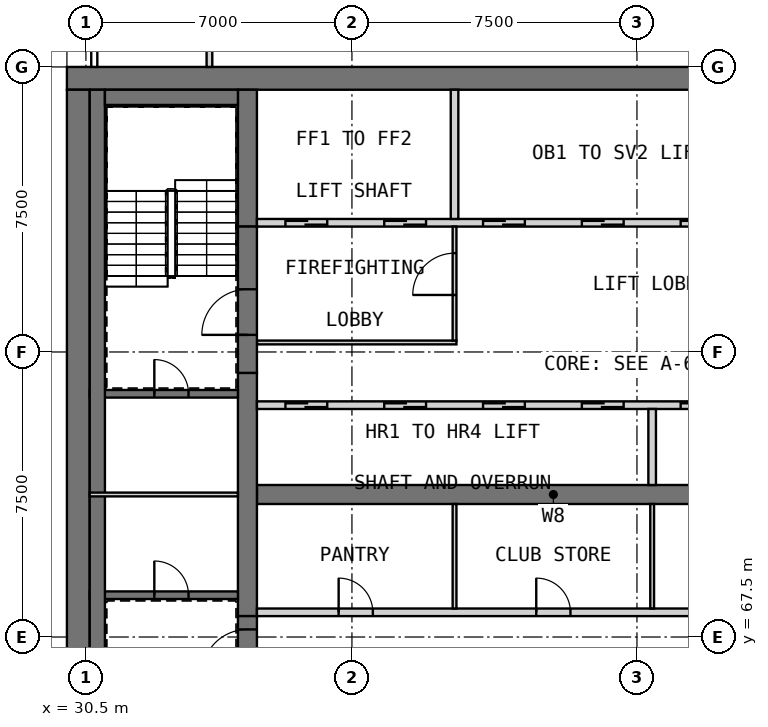
"""IFC4 building model, lengths in metres.
Left out: names, types, materials, properties, quantities, classifications, styles, units other than length and angle.
Written with IfcOpenShell. Run it as: python <this file> out.ifc"""

import sys

from ifc_helpers import new_model, si_unit, direction, frame, frame_2d, origin, place, context, subcontext, project, spatial, rectangle, extrude, element, fill, save


model = new_model("IFC4")
c1 = context("Model", 3, precision=1e-05, world=origin(), true_north=direction((0.0, 1.0)))
c2 = subcontext(c1, "Body", "Model", "MODEL_VIEW")
j1 = project(units=[si_unit("LENGTHUNIT", "METRE"), si_unit("PLANEANGLEUNIT", "RADIAN")], contexts=[c1])
p1 = place(None, origin())
s1 = spatial("IfcSite", under=j1, at=p1, CompositionType="ELEMENT")
p2 = place(p1, origin())
s2 = spatial("IfcBuilding", under=s1, at=p2, CompositionType="ELEMENT")
p3 = place(p2, frame((0.0, 0.0, 308.7)))
s3 = spatial("IfcBuildingStorey", under=s2, at=p3, CompositionType="ELEMENT", Elevation=308.7)
p4 = place(p3, frame((30.0, 82.2, 0.0), z_axis=(0.0, 0.0, 1.0), x_axis=(1.0, 0.0, 0.0)))
e1 = element("IfcWall", 1, at=p4, inside=s3, PredefinedType="SHEAR", context=c2, shape_type="SweptSolid", body=[
    extrude(rectangle(XDim=30.0, YDim=0.6, at=frame_2d((15.0, 0.0))), origin(), (0.0, 0.0, 1.0), 6.0),
])
p5 = place(p3, frame((30.3, 60.6, 0.0), z_axis=(0.0, 0.0, 1.0), x_axis=(0.0, 1.0, 0.0)))
e2 = element("IfcWall", 2, at=p5, inside=s3, PredefinedType="SHEAR", context=c2, shape_type="SweptSolid", body=[
    extrude(rectangle(XDim=21.3, YDim=0.6, at=frame_2d((10.65, 0.0))), origin(), (0.0, 0.0, 1.0), 6.0),
])
p6 = place(p3, frame((35.0, 71.25, 0.0), z_axis=(0.0, 0.0, 1.0), x_axis=(1.0, 0.0, 0.0)))
e3 = element("IfcWall", 3, at=p6, inside=s3, PredefinedType="SHEAR", context=c2, shape_type="SweptSolid", body=[
    extrude(rectangle(XDim=15.6, YDim=0.5, at=frame_2d((7.8, 0.0))), origin(), (0.0, 0.0, 1.0), 6.0),
])
p7 = place(p3, frame((34.75, 68.05, 0.0), z_axis=(0.0, 0.0, 1.0), x_axis=(0.0, 1.0, 0.0)))
e4 = element("IfcWall", 4, at=p7, inside=s3, PredefinedType="SHEAR", context=c2, shape_type="SweptSolid", body=[
    extrude(rectangle(XDim=6.4, YDim=0.5, at=frame_2d((3.2, 0.0))), origin(), (0.0, 0.0, 1.0), 6.0),
])
p8 = place(p3, frame((34.75, 78.3, 0.0), z_axis=(0.0, 0.0, 1.0), x_axis=(0.0, 1.0, 0.0)))
e5 = element("IfcWall", 5, at=p8, inside=s3, PredefinedType="SHEAR", context=c2, shape_type="SweptSolid", body=[
    extrude(rectangle(XDim=3.6, YDim=0.5, at=frame_2d((1.8, 0.0))), origin(), (0.0, 0.0, 1.0), 6.0),
])
p9 = place(p2, frame((0.0, 0.0, 34.0)))
s4 = spatial("IfcBuildingStorey", under=s2, at=p9, CompositionType="ELEMENT", Elevation=34.0)
for number, where, z_axis, x_axis in (
    (6, (29.7, 70.8, 0.0), (0.0, 0.0, 1.0), (0.0, 1.0, 0.0)),
    (7, (29.7, 75.675, 0.0), (0.0, 0.0, 1.0), (0.0, 1.0, 0.0)),
    (8, (29.7, 80.55, 0.0), (0.0, 0.0, 1.0), (0.0, 1.0, 0.0)),
):
    element("IfcWall", number, at=place(p9, frame(where, z_axis=z_axis, x_axis=x_axis)), inside=s4, PredefinedType="SOLIDWALL", context=c2, shape_type="SweptSolid", body=[
        extrude(rectangle(XDim=0.9, YDim=0.6, at=frame_2d((0.45, 0.0))), origin(), (0.0, 0.0, 1.0), 286.2),
    ])
p10 = place(p3, frame((35.0, 68.15, 0.0), z_axis=(0.0, 0.0, 1.0), x_axis=(1.0, 0.0, 0.0)))
e9 = element("IfcWall", 9, at=p10, inside=s3, PredefinedType="PARTITIONING", context=c2, shape_type="SweptSolid", body=[
    extrude(rectangle(XDim=15.6, YDim=0.2, at=frame_2d((7.8, 0.0))), origin(), (0.0, 0.0, 1.0), 5.59),
])
p11 = place(p10, frame((2.15, 0.0, 0.0)))
e10 = element("IfcOpeningElement", 10, at=p11, cuts=e9, PredefinedType="OPENING", context=c2, shape_type="SweptSolid", body=[
    extrude(rectangle(XDim=0.9, YDim=2.1, at=frame_2d((0.45, 1.05))), frame((0.0, 0.11, 0.0), z_axis=(0.0, -1.0, 0.0), x_axis=(1.0, 0.0, 0.0)), (0.0, 0.0, 1.0), 0.22),
])
p12 = place(p10, frame((7.35, 0.0, 0.0)))
e11 = element("IfcOpeningElement", 11, at=p12, cuts=e9, PredefinedType="OPENING", context=c2, shape_type="SweptSolid", body=[
    extrude(rectangle(XDim=0.9, YDim=2.1, at=frame_2d((0.45, 1.05))), frame((0.0, 0.11, 0.0), z_axis=(0.0, -1.0, 0.0), x_axis=(1.0, 0.0, 0.0)), (0.0, 0.0, 1.0), 0.22),
])
p13 = place(p10, frame((12.55, 0.0, 0.0)))
e12 = element("IfcOpeningElement", 12, at=p13, cuts=e9, PredefinedType="OPENING", context=c2, shape_type="SweptSolid", body=[
    extrude(rectangle(XDim=0.9, YDim=2.1, at=frame_2d((0.45, 1.05))), frame((0.0, 0.11, 0.0), z_axis=(0.0, -1.0, 0.0), x_axis=(1.0, 0.0, 0.0)), (0.0, 0.0, 1.0), 0.22),
])
for number, where, z_axis, x_axis in (
    (13, (40.2, 68.25, 0.0), (0.0, 0.0, 1.0), (0.0, 1.0, 0.0)),
    (14, (45.4, 68.25, 0.0), (0.0, 0.0, 1.0), (0.0, 1.0, 0.0)),
):
    element("IfcWall", number, at=place(p3, frame(where, z_axis=z_axis, x_axis=x_axis)), inside=s3, PredefinedType="PARTITIONING", context=c2, shape_type="SweptSolid", body=[
        extrude(rectangle(XDim=2.75, YDim=0.1, at=frame_2d((1.375, 0.0))), origin(), (0.0, 0.0, 1.0), 5.59),
    ])
p14 = place(p3, frame((35.0, 73.6, 0.0), z_axis=(0.0, 0.0, 1.0), x_axis=(1.0, 0.0, 0.0)))
e15 = element("IfcWall", 15, at=p14, inside=s3, PredefinedType="SOLIDWALL", context=c2, shape_type="SweptSolid", body=[
    extrude(rectangle(XDim=15.6, YDim=0.2, at=frame_2d((7.8, 0.0))), origin(), (0.0, 0.0, 1.0), 6.0),
])
p15 = place(p14, frame((0.75, 0.0, 0.0)))
e16 = element("IfcOpeningElement", 16, at=p15, cuts=e15, PredefinedType="OPENING", context=c2, shape_type="SweptSolid", body=[
    extrude(rectangle(XDim=1.1, YDim=2.1, at=frame_2d((0.55, 1.05))), frame((0.0, 0.11, 0.0), z_axis=(0.0, -1.0, 0.0), x_axis=(1.0, 0.0, 0.0)), (0.0, 0.0, 1.0), 0.22),
])
p16 = place(p14, frame((3.35, 0.0, 0.0)))
e17 = element("IfcOpeningElement", 17, at=p16, cuts=e15, PredefinedType="OPENING", context=c2, shape_type="SweptSolid", body=[
    extrude(rectangle(XDim=1.1, YDim=2.1, at=frame_2d((0.55, 1.05))), frame((0.0, 0.11, 0.0), z_axis=(0.0, -1.0, 0.0), x_axis=(1.0, 0.0, 0.0)), (0.0, 0.0, 1.0), 0.22),
])
p17 = place(p14, frame((5.95, 0.0, 0.0)))
e18 = element("IfcOpeningElement", 18, at=p17, cuts=e15, PredefinedType="OPENING", context=c2, shape_type="SweptSolid", body=[
    extrude(rectangle(XDim=1.1, YDim=2.1, at=frame_2d((0.55, 1.05))), frame((0.0, 0.11, 0.0), z_axis=(0.0, -1.0, 0.0), x_axis=(1.0, 0.0, 0.0)), (0.0, 0.0, 1.0), 0.22),
])
p18 = place(p14, frame((8.55, 0.0, 0.0)))
e19 = element("IfcOpeningElement", 19, at=p18, cuts=e15, PredefinedType="OPENING", context=c2, shape_type="SweptSolid", body=[
    extrude(rectangle(XDim=1.1, YDim=2.1, at=frame_2d((0.55, 1.05))), frame((0.0, 0.11, 0.0), z_axis=(0.0, -1.0, 0.0), x_axis=(1.0, 0.0, 0.0)), (0.0, 0.0, 1.0), 0.22),
])
p19 = place(p14, frame((11.15, 0.0, 0.0)))
e20 = element("IfcOpeningElement", 20, at=p19, cuts=e15, PredefinedType="OPENING", context=c2, shape_type="SweptSolid", body=[
    extrude(rectangle(XDim=1.1, YDim=2.1, at=frame_2d((0.55, 1.05))), frame((0.0, 0.11, 0.0), z_axis=(0.0, -1.0, 0.0), x_axis=(1.0, 0.0, 0.0)), (0.0, 0.0, 1.0), 0.22),
])
p20 = place(p14, frame((13.75, 0.0, 0.0)))
e21 = element("IfcOpeningElement", 21, at=p20, cuts=e15, PredefinedType="OPENING", context=c2, shape_type="SweptSolid", body=[
    extrude(rectangle(XDim=1.1, YDim=2.1, at=frame_2d((0.55, 1.05))), frame((0.0, 0.11, 0.0), z_axis=(0.0, -1.0, 0.0), x_axis=(1.0, 0.0, 0.0)), (0.0, 0.0, 1.0), 0.22),
])
p21 = place(p3, frame((45.4, 71.5, 0.0), z_axis=(0.0, 0.0, 1.0), x_axis=(0.0, 1.0, 0.0)))
e22 = element("IfcWall", 22, at=p21, inside=s3, PredefinedType="SOLIDWALL", context=c2, shape_type="SweptSolid", body=[
    extrude(rectangle(XDim=2.0, YDim=0.2, at=frame_2d((1.0, 0.0))), origin(), (0.0, 0.0, 1.0), 6.0),
])
p22 = place(p3, frame((35.0, 78.4, 0.0), z_axis=(0.0, 0.0, 1.0), x_axis=(1.0, 0.0, 0.0)))
e23 = element("IfcWall", 23, at=p22, inside=s3, PredefinedType="SOLIDWALL", context=c2, shape_type="SweptSolid", body=[
    extrude(rectangle(XDim=15.6, YDim=0.2, at=frame_2d((7.8, 0.0))), origin(), (0.0, 0.0, 1.0), 6.0),
])
p23 = place(p22, frame((0.75, 0.0, 0.0)))
e24 = element("IfcOpeningElement", 24, at=p23, cuts=e23, PredefinedType="OPENING", context=c2, shape_type="SweptSolid", body=[
    extrude(rectangle(XDim=1.1, YDim=2.1, at=frame_2d((0.55, 1.05))), frame((0.0, 0.11, 0.0), z_axis=(0.0, -1.0, 0.0), x_axis=(1.0, 0.0, 0.0)), (0.0, 0.0, 1.0), 0.22),
])
p24 = place(p22, frame((3.35, 0.0, 0.0)))
e25 = element("IfcOpeningElement", 25, at=p24, cuts=e23, PredefinedType="OPENING", context=c2, shape_type="SweptSolid", body=[
    extrude(rectangle(XDim=1.1, YDim=2.1, at=frame_2d((0.55, 1.05))), frame((0.0, 0.11, 0.0), z_axis=(0.0, -1.0, 0.0), x_axis=(1.0, 0.0, 0.0)), (0.0, 0.0, 1.0), 0.22),
])
p25 = place(p22, frame((5.95, 0.0, 0.0)))
e26 = element("IfcOpeningElement", 26, at=p25, cuts=e23, PredefinedType="OPENING", context=c2, shape_type="SweptSolid", body=[
    extrude(rectangle(XDim=1.1, YDim=2.1, at=frame_2d((0.55, 1.05))), frame((0.0, 0.11, 0.0), z_axis=(0.0, -1.0, 0.0), x_axis=(1.0, 0.0, 0.0)), (0.0, 0.0, 1.0), 0.22),
])
p26 = place(p22, frame((8.55, 0.0, 0.0)))
e27 = element("IfcOpeningElement", 27, at=p26, cuts=e23, PredefinedType="OPENING", context=c2, shape_type="SweptSolid", body=[
    extrude(rectangle(XDim=1.1, YDim=2.1, at=frame_2d((0.55, 1.05))), frame((0.0, 0.11, 0.0), z_axis=(0.0, -1.0, 0.0), x_axis=(1.0, 0.0, 0.0)), (0.0, 0.0, 1.0), 0.22),
])
p27 = place(p22, frame((11.15, 0.0, 0.0)))
e28 = element("IfcOpeningElement", 28, at=p27, cuts=e23, PredefinedType="OPENING", context=c2, shape_type="SweptSolid", body=[
    extrude(rectangle(XDim=1.1, YDim=2.1, at=frame_2d((0.55, 1.05))), frame((0.0, 0.11, 0.0), z_axis=(0.0, -1.0, 0.0), x_axis=(1.0, 0.0, 0.0)), (0.0, 0.0, 1.0), 0.22),
])
p28 = place(p22, frame((13.75, 0.0, 0.0)))
e29 = element("IfcOpeningElement", 29, at=p28, cuts=e23, PredefinedType="OPENING", context=c2, shape_type="SweptSolid", body=[
    extrude(rectangle(XDim=1.1, YDim=2.1, at=frame_2d((0.55, 1.05))), frame((0.0, 0.11, 0.0), z_axis=(0.0, -1.0, 0.0), x_axis=(1.0, 0.0, 0.0)), (0.0, 0.0, 1.0), 0.22),
])
p29 = place(p3, frame((40.2, 78.5, 0.0), z_axis=(0.0, 0.0, 1.0), x_axis=(0.0, 1.0, 0.0)))
e30 = element("IfcWall", 30, at=p29, inside=s3, PredefinedType="SOLIDWALL", context=c2, shape_type="SweptSolid", body=[
    extrude(rectangle(XDim=3.4, YDim=0.2, at=frame_2d((1.7, 0.0))), origin(), (0.0, 0.0, 1.0), 6.0),
])
p30 = place(p3, frame((35.0, 75.25, 0.0), z_axis=(0.0, 0.0, 1.0), x_axis=(1.0, 0.0, 0.0)))
e31 = element("IfcWall", 31, at=p30, inside=s3, PredefinedType="PARTITIONING", context=c2, shape_type="SweptSolid", body=[
    extrude(rectangle(XDim=5.25, YDim=0.1, at=frame_2d((2.625, 0.0))), origin(), (0.0, 0.0, 1.0), 5.59),
])
p31 = place(p3, frame((40.2, 75.3, 0.0), z_axis=(0.0, 0.0, 1.0), x_axis=(0.0, 1.0, 0.0)))
e32 = element("IfcWall", 32, at=p31, inside=s3, PredefinedType="PARTITIONING", context=c2, shape_type="SweptSolid", body=[
    extrude(rectangle(XDim=3.0, YDim=0.1, at=frame_2d((1.5, 0.0))), origin(), (0.0, 0.0, 1.0), 5.59),
])
p32 = place(p31, frame((1.2, 0.0, 0.0)))
e33 = element("IfcOpeningElement", 33, at=p32, cuts=e32, PredefinedType="OPENING", context=c2, shape_type="SweptSolid", body=[
    extrude(rectangle(XDim=1.1, YDim=2.1, at=frame_2d((0.55, 1.05))), frame((0.0, 0.06, 0.0), z_axis=(0.0, -1.0, 0.0), x_axis=(1.0, 0.0, 0.0)), (0.0, 0.0, 1.0), 0.12),
])
p33 = place(p3, frame((34.75, 64.2, 0.0), z_axis=(0.0, 0.0, 1.0), x_axis=(0.0, 1.0, 0.0)))
e34 = element("IfcWall", 34, at=p33, inside=s3, PredefinedType="SOLIDWALL", context=c2, shape_type="SweptSolid", body=[
    extrude(rectangle(XDim=3.85, YDim=0.5, at=frame_2d((1.925, 0.0))), origin(), (0.0, 0.0, 1.0), 4.8),
])
p34 = place(p33, frame((2.3, 0.0, 0.0)))
e35 = element("IfcOpeningElement", 35, at=p34, cuts=e34, PredefinedType="OPENING", context=c2, shape_type="SweptSolid", body=[
    extrude(rectangle(XDim=1.2, YDim=2.1, at=frame_2d((0.6, 1.05))), frame((0.0, 0.26, 0.0), z_axis=(0.0, -1.0, 0.0), x_axis=(1.0, 0.0, 0.0)), (0.0, 0.0, 1.0), 0.52),
])
p35 = place(p3, frame((34.75, 74.45, 0.0), z_axis=(0.0, 0.0, 1.0), x_axis=(0.0, 1.0, 0.0)))
e36 = element("IfcWall", 36, at=p35, inside=s3, PredefinedType="SOLIDWALL", context=c2, shape_type="SweptSolid", body=[
    extrude(rectangle(XDim=3.85, YDim=0.5, at=frame_2d((1.925, 0.0))), origin(), (0.0, 0.0, 1.0), 4.8),
])
p36 = place(p35, frame((1.0, 0.0, 0.0)))
e37 = element("IfcOpeningElement", 37, at=p36, cuts=e36, PredefinedType="OPENING", context=c2, shape_type="SweptSolid", body=[
    extrude(rectangle(XDim=1.2, YDim=2.1, at=frame_2d((0.6, 1.05))), frame((0.0, 0.26, 0.0), z_axis=(0.0, -1.0, 0.0), x_axis=(1.0, 0.0, 0.0)), (0.0, 0.0, 1.0), 0.52),
])
p37 = place(p3, frame((30.6, 68.6, 0.0), z_axis=(0.0, 0.0, 1.0), x_axis=(1.0, 0.0, 0.0)))
e38 = element("IfcWall", 38, at=p37, inside=s3, PredefinedType="SOLIDWALL", context=c2, shape_type="SweptSolid", body=[
    extrude(rectangle(XDim=3.9, YDim=0.2, at=frame_2d((1.95, 0.0))), origin(), (0.0, 0.0, 1.0), 5.59),
])
p38 = place(p37, frame((1.7, 0.0, 0.0)))
e39 = element("IfcOpeningElement", 39, at=p38, cuts=e38, PredefinedType="OPENING", context=c2, shape_type="SweptSolid", body=[
    extrude(rectangle(XDim=0.9, YDim=2.1, at=frame_2d((0.45, 1.05))), frame((0.0, 0.11, 0.0), z_axis=(0.0, -1.0, 0.0), x_axis=(1.0, 0.0, 0.0)), (0.0, 0.0, 1.0), 0.22),
])
p39 = place(p3, frame((30.6, 73.9, 0.0), z_axis=(0.0, 0.0, 1.0), x_axis=(1.0, 0.0, 0.0)))
e40 = element("IfcWall", 40, at=p39, inside=s3, PredefinedType="SOLIDWALL", context=c2, shape_type="SweptSolid", body=[
    extrude(rectangle(XDim=3.9, YDim=0.2, at=frame_2d((1.95, 0.0))), origin(), (0.0, 0.0, 1.0), 5.59),
])
p40 = place(p39, frame((1.7, 0.0, 0.0)))
e41 = element("IfcOpeningElement", 41, at=p40, cuts=e40, PredefinedType="OPENING", context=c2, shape_type="SweptSolid", body=[
    extrude(rectangle(XDim=0.9, YDim=2.1, at=frame_2d((0.45, 1.05))), frame((0.0, 0.11, 0.0), z_axis=(0.0, -1.0, 0.0), x_axis=(1.0, 0.0, 0.0)), (0.0, 0.0, 1.0), 0.22),
])
p41 = place(p3, frame((30.8, 60.6, 0.0), z_axis=(0.0, 0.0, 1.0), x_axis=(0.0, 1.0, 0.0)))
e42 = element("IfcWall", 42, at=p41, inside=s3, PredefinedType="SOLIDWALL", context=c2, shape_type="SweptSolid", body=[
    extrude(rectangle(XDim=21.3, YDim=0.4, at=frame_2d((10.65, 0.0))), origin(), (0.0, 0.0, 1.0), 5.59),
])
p42 = place(p3, frame((31.0, 81.7, 0.0), z_axis=(0.0, 0.0, 1.0), x_axis=(1.0, 0.0, 0.0)))
e43 = element("IfcWall", 43, at=p42, inside=s3, PredefinedType="SOLIDWALL", context=c2, shape_type="SweptSolid", body=[
    extrude(rectangle(XDim=3.5, YDim=0.4, at=frame_2d((1.75, 0.0))), origin(), (0.0, 0.0, 1.0), 5.59),
])
p43 = place(p3, frame((30.6, 71.25, 0.0), z_axis=(0.0, 0.0, 1.0), x_axis=(1.0, 0.0, 0.0)))
e44 = element("IfcWall", 44, at=p43, inside=s3, PredefinedType="PARTITIONING", context=c2, shape_type="SweptSolid", body=[
    extrude(rectangle(XDim=3.9, YDim=0.1, at=frame_2d((1.95, 0.0))), origin(), (0.0, 0.0, 1.0), 5.59),
])
p44 = place(p3, frame((33.75, 82.5, 0.0), z_axis=(0.0, 0.0, 1.0), x_axis=(0.0, 1.0, 0.0)))
e45 = element("IfcWall", 45, at=p44, inside=s3, PredefinedType="PARTITIONING", context=c2, shape_type="SweptSolid", body=[
    extrude(rectangle(XDim=1.725, YDim=0.15, at=frame_2d((0.863, 0.0))), origin(), (0.0, 0.0, 1.0), 5.6),
])
p45 = place(p11, origin())
e46 = element("IfcDoor", 46, at=p45, inside=s3, OperationType="SINGLE_SWING_RIGHT", PredefinedType="DOOR", context=c2, shape_type="SweptSolid", body=[
    extrude(rectangle(XDim=0.9, YDim=2.1, at=frame_2d((0.45, 1.05))), frame((0.0, 0.025, 0.0), z_axis=(0.0, -1.0, 0.0), x_axis=(1.0, 0.0, 0.0)), (0.0, 0.0, 1.0), 0.05),
])
fill(e10, e46)
p46 = place(p12, origin())
e47 = element("IfcDoor", 47, at=p46, inside=s3, OperationType="SINGLE_SWING_LEFT", PredefinedType="DOOR", context=c2, shape_type="SweptSolid", body=[
    extrude(rectangle(XDim=0.9, YDim=2.1, at=frame_2d((0.45, 1.05))), frame((0.0, 0.025, 0.0), z_axis=(0.0, -1.0, 0.0), x_axis=(1.0, 0.0, 0.0)), (0.0, 0.0, 1.0), 0.05),
])
fill(e11, e47)
p47 = place(p15, origin())
e48 = element("IfcDoor", 48, at=p47, inside=s3, OperationType="DOUBLE_DOOR_SLIDING", PredefinedType="DOOR", context=c2, shape_type="SweptSolid", body=[
    extrude(rectangle(XDim=1.1, YDim=2.1, at=frame_2d((0.55, 1.05))), frame((0.0, 0.025, 0.0), z_axis=(0.0, -1.0, 0.0), x_axis=(1.0, 0.0, 0.0)), (0.0, 0.0, 1.0), 0.05),
])
fill(e16, e48)
p48 = place(p16, origin())
e49 = element("IfcDoor", 49, at=p48, inside=s3, OperationType="DOUBLE_DOOR_SLIDING", PredefinedType="DOOR", context=c2, shape_type="SweptSolid", body=[
    extrude(rectangle(XDim=1.1, YDim=2.1, at=frame_2d((0.55, 1.05))), frame((0.0, 0.025, 0.0), z_axis=(0.0, -1.0, 0.0), x_axis=(1.0, 0.0, 0.0)), (0.0, 0.0, 1.0), 0.05),
])
fill(e17, e49)
p49 = place(p17, origin())
e50 = element("IfcDoor", 50, at=p49, inside=s3, OperationType="DOUBLE_DOOR_SLIDING", PredefinedType="DOOR", context=c2, shape_type="SweptSolid", body=[
    extrude(rectangle(XDim=1.1, YDim=2.1, at=frame_2d((0.55, 1.05))), frame((0.0, 0.025, 0.0), z_axis=(0.0, -1.0, 0.0), x_axis=(1.0, 0.0, 0.0)), (0.0, 0.0, 1.0), 0.05),
])
fill(e18, e50)
p50 = place(p18, origin())
e51 = element("IfcDoor", 51, at=p50, inside=s3, OperationType="DOUBLE_DOOR_SLIDING", PredefinedType="DOOR", context=c2, shape_type="SweptSolid", body=[
    extrude(rectangle(XDim=1.1, YDim=2.1, at=frame_2d((0.55, 1.05))), frame((0.0, 0.025, 0.0), z_axis=(0.0, -1.0, 0.0), x_axis=(1.0, 0.0, 0.0)), (0.0, 0.0, 1.0), 0.05),
])
fill(e19, e51)
p51 = place(p19, origin())
e52 = element("IfcDoor", 52, at=p51, inside=s3, OperationType="DOUBLE_DOOR_SLIDING", PredefinedType="DOOR", context=c2, shape_type="SweptSolid", body=[
    extrude(rectangle(XDim=1.1, YDim=2.1, at=frame_2d((0.55, 1.05))), frame((0.0, 0.025, 0.0), z_axis=(0.0, -1.0, 0.0), x_axis=(1.0, 0.0, 0.0)), (0.0, 0.0, 1.0), 0.05),
])
fill(e20, e52)
p52 = place(p23, origin())
e53 = element("IfcDoor", 53, at=p52, inside=s3, OperationType="DOUBLE_DOOR_SLIDING", PredefinedType="DOOR", context=c2, shape_type="SweptSolid", body=[
    extrude(rectangle(XDim=1.1, YDim=2.1, at=frame_2d((0.55, 1.05))), frame((0.0, 0.025, 0.0), z_axis=(0.0, -1.0, 0.0), x_axis=(1.0, 0.0, 0.0)), (0.0, 0.0, 1.0), 0.05),
])
fill(e24, e53)
p53 = place(p24, origin())
e54 = element("IfcDoor", 54, at=p53, inside=s3, OperationType="DOUBLE_DOOR_SLIDING", PredefinedType="DOOR", context=c2, shape_type="SweptSolid", body=[
    extrude(rectangle(XDim=1.1, YDim=2.1, at=frame_2d((0.55, 1.05))), frame((0.0, 0.025, 0.0), z_axis=(0.0, -1.0, 0.0), x_axis=(1.0, 0.0, 0.0)), (0.0, 0.0, 1.0), 0.05),
])
fill(e25, e54)
p54 = place(p25, origin())
e55 = element("IfcDoor", 55, at=p54, inside=s3, OperationType="DOUBLE_DOOR_SLIDING", PredefinedType="DOOR", context=c2, shape_type="SweptSolid", body=[
    extrude(rectangle(XDim=1.1, YDim=2.1, at=frame_2d((0.55, 1.05))), frame((0.0, 0.025, 0.0), z_axis=(0.0, -1.0, 0.0), x_axis=(1.0, 0.0, 0.0)), (0.0, 0.0, 1.0), 0.05),
])
fill(e26, e55)
p55 = place(p26, origin())
e56 = element("IfcDoor", 56, at=p55, inside=s3, OperationType="DOUBLE_DOOR_SLIDING", PredefinedType="DOOR", context=c2, shape_type="SweptSolid", body=[
    extrude(rectangle(XDim=1.1, YDim=2.1, at=frame_2d((0.55, 1.05))), frame((0.0, 0.025, 0.0), z_axis=(0.0, -1.0, 0.0), x_axis=(1.0, 0.0, 0.0)), (0.0, 0.0, 1.0), 0.05),
])
fill(e27, e56)
p56 = place(p27, origin())
e57 = element("IfcDoor", 57, at=p56, inside=s3, OperationType="DOUBLE_DOOR_SLIDING", PredefinedType="DOOR", context=c2, shape_type="SweptSolid", body=[
    extrude(rectangle(XDim=1.1, YDim=2.1, at=frame_2d((0.55, 1.05))), frame((0.0, 0.025, 0.0), z_axis=(0.0, -1.0, 0.0), x_axis=(1.0, 0.0, 0.0)), (0.0, 0.0, 1.0), 0.05),
])
fill(e28, e57)
p57 = place(p32, origin())
e58 = element("IfcDoor", 58, at=p57, inside=s3, OperationType="SINGLE_SWING_LEFT", PredefinedType="DOOR", context=c2, shape_type="SweptSolid", body=[
    extrude(rectangle(XDim=1.1, YDim=2.1, at=frame_2d((0.55, 1.05))), frame((0.0, 0.025, 0.0), z_axis=(0.0, -1.0, 0.0), x_axis=(1.0, 0.0, 0.0)), (0.0, 0.0, 1.0), 0.05),
])
fill(e33, e58)
p58 = place(p34, origin())
e59 = element("IfcDoor", 59, at=p58, inside=s3, OperationType="SINGLE_SWING_LEFT", PredefinedType="DOOR", context=c2, shape_type="SweptSolid", body=[
    extrude(rectangle(XDim=1.2, YDim=2.1, at=frame_2d((0.6, 1.05))), frame((0.0, 0.025, 0.0), z_axis=(0.0, -1.0, 0.0), x_axis=(1.0, 0.0, 0.0)), (0.0, 0.0, 1.0), 0.05),
])
fill(e35, e59)
p59 = place(p36, origin())
e60 = element("IfcDoor", 60, at=p59, inside=s3, OperationType="SINGLE_SWING_RIGHT", PredefinedType="DOOR", context=c2, shape_type="SweptSolid", body=[
    extrude(rectangle(XDim=1.2, YDim=2.1, at=frame_2d((0.6, 1.05))), frame((0.0, 0.025, 0.0), z_axis=(0.0, -1.0, 0.0), x_axis=(1.0, 0.0, 0.0)), (0.0, 0.0, 1.0), 0.05),
])
fill(e37, e60)
p60 = place(p38, origin())
e61 = element("IfcDoor", 61, at=p60, inside=s3, OperationType="SINGLE_SWING_LEFT", PredefinedType="DOOR", context=c2, shape_type="SweptSolid", body=[
    extrude(rectangle(XDim=0.9, YDim=2.1, at=frame_2d((0.45, 1.05))), frame((0.0, 0.025, 0.0), z_axis=(0.0, -1.0, 0.0), x_axis=(1.0, 0.0, 0.0)), (0.0, 0.0, 1.0), 0.05),
])
fill(e39, e61)
p61 = place(p40, origin())
e62 = element("IfcDoor", 62, at=p61, inside=s3, OperationType="SINGLE_SWING_RIGHT", PredefinedType="DOOR", context=c2, shape_type="SweptSolid", body=[
    extrude(rectangle(XDim=0.9, YDim=2.1, at=frame_2d((0.45, 1.05))), frame((0.0, 0.025, 0.0), z_axis=(0.0, -1.0, 0.0), x_axis=(1.0, 0.0, 0.0)), (0.0, 0.0, 1.0), 0.05),
])
fill(e41, e62)
save(model, sys.argv[1])
